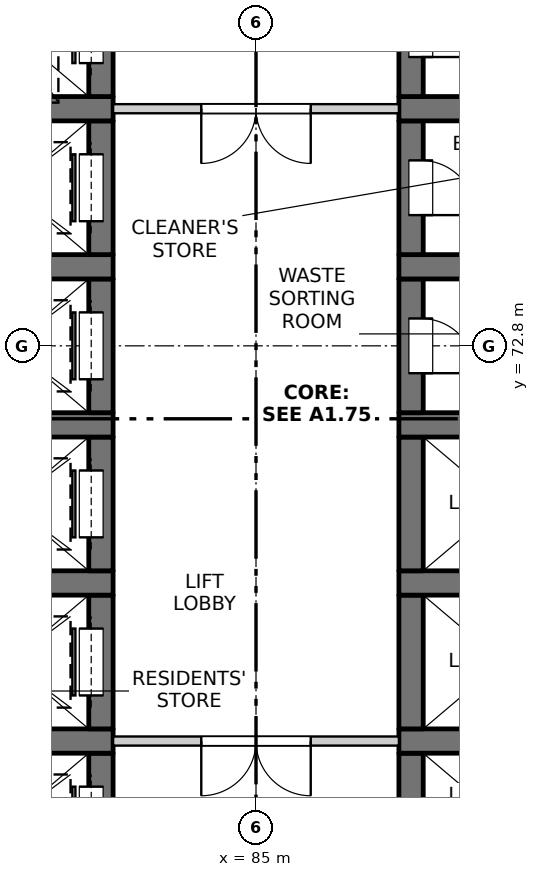
"""IFC4 building model, lengths in metres.
Left out: names, types, materials, properties, quantities, classifications, styles, units other than length and angle.
Written with IfcOpenShell. Run it as: python <this file> out.ifc"""

import sys

from ifc_helpers import new_model, si_unit, direction, frame, frame_2d, origin, place, context, subcontext, project, spatial, rectangle, extrude, element, fill, save


model = new_model("IFC4")
c1 = context("Model", 3, precision=1e-05, world=origin(), true_north=direction((0.0, 1.0)))
c2 = subcontext(c1, "Body", "Model", "MODEL_VIEW")
j1 = project(units=[si_unit("LENGTHUNIT", "METRE"), si_unit("PLANEANGLEUNIT", "RADIAN")], contexts=[c1])
p1 = place(None, origin())
s1 = spatial("IfcSite", under=j1, at=p1, CompositionType="ELEMENT")
p2 = place(p1, origin())
s2 = spatial("IfcBuilding", under=s1, at=p2, CompositionType="ELEMENT")
p3 = place(p2, frame((0.0, 0.0, 39.9)))
s3 = spatial("IfcBuildingStorey", under=s2, at=p3, CompositionType="ELEMENT", Elevation=39.9)
p4 = place(p3, frame((82.45, 63.9, -0.25), z_axis=(0.0, 0.0, 1.0), x_axis=(0.0, 1.0, 0.0)))
e1 = element("IfcWall", 1, at=p4, inside=s3, PredefinedType="SOLIDWALL", context=c2, shape_type="SweptSolid", body=[
    extrude(rectangle(XDim=2.2, YDim=0.4, at=frame_2d((1.1, 0.0))), origin(), (0.0, 0.0, 1.0), 3.4),
])
p5 = place(p4, frame((0.55, 0.0, 0.25)))
e2 = element("IfcOpeningElement", 2, at=p5, cuts=e1, PredefinedType="OPENING", context=c2, shape_type="SweptSolid", body=[
    extrude(rectangle(XDim=1.1, YDim=2.1, at=frame_2d((0.55, 1.05))), frame((0.0, 0.21, 0.0), z_axis=(0.0, -1.0, 0.0), x_axis=(1.0, 0.0, 0.0)), (0.0, 0.0, 1.0), 0.42),
])
p6 = place(p3, frame((79.65, 66.3, -0.25), z_axis=(0.0, 0.0, 1.0), x_axis=(1.0, 0.0, 0.0)))
e3 = element("IfcWall", 3, at=p6, inside=s3, PredefinedType="SOLIDWALL", context=c2, shape_type="SweptSolid", body=[
    extrude(rectangle(XDim=3.0, YDim=0.4, at=frame_2d((1.5, 0.0))), origin(), (0.0, 0.0, 1.0), 3.4),
])
p7 = place(p3, frame((82.45, 66.5, -0.25), z_axis=(0.0, 0.0, 1.0), x_axis=(0.0, 1.0, 0.0)))
e4 = element("IfcWall", 4, at=p7, inside=s3, PredefinedType="SOLIDWALL", context=c2, shape_type="SweptSolid", body=[
    extrude(rectangle(XDim=2.2, YDim=0.4, at=frame_2d((1.1, 0.0))), origin(), (0.0, 0.0, 1.0), 3.4),
])
p8 = place(p7, frame((0.55, 0.0, 0.25)))
e5 = element("IfcOpeningElement", 5, at=p8, cuts=e4, PredefinedType="OPENING", context=c2, shape_type="SweptSolid", body=[
    extrude(rectangle(XDim=1.1, YDim=2.1, at=frame_2d((0.55, 1.05))), frame((0.0, 0.21, 0.0), z_axis=(0.0, -1.0, 0.0), x_axis=(1.0, 0.0, 0.0)), (0.0, 0.0, 1.0), 0.42),
])
p9 = place(p3, frame((79.65, 68.9, -0.25), z_axis=(0.0, 0.0, 1.0), x_axis=(1.0, 0.0, 0.0)))
e6 = element("IfcWall", 6, at=p9, inside=s3, PredefinedType="SOLIDWALL", context=c2, shape_type="SweptSolid", body=[
    extrude(rectangle(XDim=3.0, YDim=0.4, at=frame_2d((1.5, 0.0))), origin(), (0.0, 0.0, 1.0), 3.4),
])
p10 = place(p3, frame((82.45, 69.1, -0.25), z_axis=(0.0, 0.0, 1.0), x_axis=(0.0, 1.0, 0.0)))
e7 = element("IfcWall", 7, at=p10, inside=s3, PredefinedType="SOLIDWALL", context=c2, shape_type="SweptSolid", body=[
    extrude(rectangle(XDim=2.2, YDim=0.4, at=frame_2d((1.1, 0.0))), origin(), (0.0, 0.0, 1.0), 3.4),
])
p11 = place(p10, frame((0.55, 0.0, 0.25)))
e8 = element("IfcOpeningElement", 8, at=p11, cuts=e7, PredefinedType="OPENING", context=c2, shape_type="SweptSolid", body=[
    extrude(rectangle(XDim=1.1, YDim=2.1, at=frame_2d((0.55, 1.05))), frame((0.0, 0.21, 0.0), z_axis=(0.0, -1.0, 0.0), x_axis=(1.0, 0.0, 0.0)), (0.0, 0.0, 1.0), 0.42),
])
p12 = place(p3, frame((79.65, 71.5, -0.25), z_axis=(0.0, 0.0, 1.0), x_axis=(1.0, 0.0, 0.0)))
e9 = element("IfcWall", 9, at=p12, inside=s3, PredefinedType="SOLIDWALL", context=c2, shape_type="SweptSolid", body=[
    extrude(rectangle(XDim=3.0, YDim=0.4, at=frame_2d((1.5, 0.0))), origin(), (0.0, 0.0, 1.0), 3.4),
])
p13 = place(p3, frame((82.45, 71.7, -0.25), z_axis=(0.0, 0.0, 1.0), x_axis=(0.0, 1.0, 0.0)))
e10 = element("IfcWall", 10, at=p13, inside=s3, PredefinedType="SOLIDWALL", context=c2, shape_type="SweptSolid", body=[
    extrude(rectangle(XDim=2.2, YDim=0.4, at=frame_2d((1.1, 0.0))), origin(), (0.0, 0.0, 1.0), 3.4),
])
p14 = place(p13, frame((0.55, 0.0, 0.25)))
e11 = element("IfcOpeningElement", 11, at=p14, cuts=e10, PredefinedType="OPENING", context=c2, shape_type="SweptSolid", body=[
    extrude(rectangle(XDim=1.1, YDim=2.1, at=frame_2d((0.55, 1.05))), frame((0.0, 0.21, 0.0), z_axis=(0.0, -1.0, 0.0), x_axis=(1.0, 0.0, 0.0)), (0.0, 0.0, 1.0), 0.42),
])
p15 = place(p3, frame((79.65, 74.1, -0.25), z_axis=(0.0, 0.0, 1.0), x_axis=(1.0, 0.0, 0.0)))
e12 = element("IfcWall", 12, at=p15, inside=s3, PredefinedType="SOLIDWALL", context=c2, shape_type="SweptSolid", body=[
    extrude(rectangle(XDim=3.0, YDim=0.4, at=frame_2d((1.5, 0.0))), origin(), (0.0, 0.0, 1.0), 3.4),
])
p16 = place(p3, frame((82.45, 74.3, -0.25), z_axis=(0.0, 0.0, 1.0), x_axis=(0.0, 1.0, 0.0)))
e13 = element("IfcWall", 13, at=p16, inside=s3, PredefinedType="SOLIDWALL", context=c2, shape_type="SweptSolid", body=[
    extrude(rectangle(XDim=2.2, YDim=0.4, at=frame_2d((1.1, 0.0))), origin(), (0.0, 0.0, 1.0), 3.4),
])
p17 = place(p16, frame((0.55, 0.0, 0.25)))
e14 = element("IfcOpeningElement", 14, at=p17, cuts=e13, PredefinedType="OPENING", context=c2, shape_type="SweptSolid", body=[
    extrude(rectangle(XDim=1.1, YDim=2.1, at=frame_2d((0.55, 1.05))), frame((0.0, 0.21, 0.0), z_axis=(0.0, -1.0, 0.0), x_axis=(1.0, 0.0, 0.0)), (0.0, 0.0, 1.0), 0.42),
])
p18 = place(p3, frame((79.65, 76.7, -0.25), z_axis=(0.0, 0.0, 1.0), x_axis=(1.0, 0.0, 0.0)))
e15 = element("IfcWall", 15, at=p18, inside=s3, PredefinedType="SOLIDWALL", context=c2, shape_type="SweptSolid", body=[
    extrude(rectangle(XDim=3.0, YDim=0.4, at=frame_2d((1.5, 0.0))), origin(), (0.0, 0.0, 1.0), 3.4),
])
p19 = place(p3, frame((82.45, 76.9, -0.25), z_axis=(0.0, 0.0, 1.0), x_axis=(0.0, 1.0, 0.0)))
e16 = element("IfcWall", 16, at=p19, inside=s3, PredefinedType="SOLIDWALL", context=c2, shape_type="SweptSolid", body=[
    extrude(rectangle(XDim=2.2, YDim=0.4, at=frame_2d((1.1, 0.0))), origin(), (0.0, 0.0, 1.0), 3.4),
])
p20 = place(p19, frame((0.55, 0.0, 0.25)))
e17 = element("IfcOpeningElement", 17, at=p20, cuts=e16, PredefinedType="OPENING", context=c2, shape_type="SweptSolid", body=[
    extrude(rectangle(XDim=1.1, YDim=2.1, at=frame_2d((0.55, 1.05))), frame((0.0, 0.21, 0.0), z_axis=(0.0, -1.0, 0.0), x_axis=(1.0, 0.0, 0.0)), (0.0, 0.0, 1.0), 0.42),
])
p21 = place(p3, frame((87.55, 63.9, -0.25), z_axis=(0.0, 0.0, 1.0), x_axis=(0.0, 1.0, 0.0)))
e18 = element("IfcWall", 18, at=p21, inside=s3, PredefinedType="SOLIDWALL", context=c2, shape_type="SweptSolid", body=[
    extrude(rectangle(XDim=2.2, YDim=0.4, at=frame_2d((1.1, 0.0))), origin(), (0.0, 0.0, 1.0), 3.4),
])
p22 = place(p3, frame((87.35, 66.3, -0.25), z_axis=(0.0, 0.0, 1.0), x_axis=(1.0, 0.0, 0.0)))
e19 = element("IfcWall", 19, at=p22, inside=s3, PredefinedType="SOLIDWALL", context=c2, shape_type="SweptSolid", body=[
    extrude(rectangle(XDim=3.0, YDim=0.4, at=frame_2d((1.5, 0.0))), origin(), (0.0, 0.0, 1.0), 3.4),
])
p23 = place(p3, frame((87.55, 66.5, -0.25), z_axis=(0.0, 0.0, 1.0), x_axis=(0.0, 1.0, 0.0)))
e20 = element("IfcWall", 20, at=p23, inside=s3, PredefinedType="SOLIDWALL", context=c2, shape_type="SweptSolid", body=[
    extrude(rectangle(XDim=2.2, YDim=0.4, at=frame_2d((1.1, 0.0))), origin(), (0.0, 0.0, 1.0), 3.4),
])
p24 = place(p3, frame((87.35, 68.9, -0.25), z_axis=(0.0, 0.0, 1.0), x_axis=(1.0, 0.0, 0.0)))
e21 = element("IfcWall", 21, at=p24, inside=s3, PredefinedType="SOLIDWALL", context=c2, shape_type="SweptSolid", body=[
    extrude(rectangle(XDim=3.0, YDim=0.4, at=frame_2d((1.5, 0.0))), origin(), (0.0, 0.0, 1.0), 3.4),
])
p25 = place(p3, frame((87.55, 69.1, -0.25), z_axis=(0.0, 0.0, 1.0), x_axis=(0.0, 1.0, 0.0)))
e22 = element("IfcWall", 22, at=p25, inside=s3, PredefinedType="SOLIDWALL", context=c2, shape_type="SweptSolid", body=[
    extrude(rectangle(XDim=2.2, YDim=0.4, at=frame_2d((1.1, 0.0))), origin(), (0.0, 0.0, 1.0), 3.4),
])
p26 = place(p3, frame((87.35, 71.5, -0.25), z_axis=(0.0, 0.0, 1.0), x_axis=(1.0, 0.0, 0.0)))
e23 = element("IfcWall", 23, at=p26, inside=s3, PredefinedType="SOLIDWALL", context=c2, shape_type="SweptSolid", body=[
    extrude(rectangle(XDim=3.0, YDim=0.4, at=frame_2d((1.5, 0.0))), origin(), (0.0, 0.0, 1.0), 3.4),
])
p27 = place(p3, frame((87.55, 71.7, -0.25), z_axis=(0.0, 0.0, 1.0), x_axis=(0.0, 1.0, 0.0)))
e24 = element("IfcWall", 24, at=p27, inside=s3, PredefinedType="SOLIDWALL", context=c2, shape_type="SweptSolid", body=[
    extrude(rectangle(XDim=2.2, YDim=0.4, at=frame_2d((1.1, 0.0))), origin(), (0.0, 0.0, 1.0), 3.4),
])
p28 = place(p27, frame((0.65, 0.0, 0.25)))
e25 = element("IfcOpeningElement", 25, at=p28, cuts=e24, PredefinedType="OPENING", context=c2, shape_type="SweptSolid", body=[
    extrude(rectangle(XDim=0.9, YDim=2.1, at=frame_2d((0.45, 1.05))), frame((0.0, 0.21, 0.0), z_axis=(0.0, -1.0, 0.0), x_axis=(1.0, 0.0, 0.0)), (0.0, 0.0, 1.0), 0.42),
])
p29 = place(p3, frame((87.35, 74.1, -0.25), z_axis=(0.0, 0.0, 1.0), x_axis=(1.0, 0.0, 0.0)))
e26 = element("IfcWall", 26, at=p29, inside=s3, PredefinedType="SOLIDWALL", context=c2, shape_type="SweptSolid", body=[
    extrude(rectangle(XDim=3.0, YDim=0.4, at=frame_2d((1.5, 0.0))), origin(), (0.0, 0.0, 1.0), 3.4),
])
p30 = place(p3, frame((87.55, 74.3, -0.25), z_axis=(0.0, 0.0, 1.0), x_axis=(0.0, 1.0, 0.0)))
e27 = element("IfcWall", 27, at=p30, inside=s3, PredefinedType="SOLIDWALL", context=c2, shape_type="SweptSolid", body=[
    extrude(rectangle(XDim=2.2, YDim=0.4, at=frame_2d((1.1, 0.0))), origin(), (0.0, 0.0, 1.0), 3.4),
])
p31 = place(p30, frame((0.65, 0.0, 0.25)))
e28 = element("IfcOpeningElement", 28, at=p31, cuts=e27, PredefinedType="OPENING", context=c2, shape_type="SweptSolid", body=[
    extrude(rectangle(XDim=0.9, YDim=2.1, at=frame_2d((0.45, 1.05))), frame((0.0, 0.21, 0.0), z_axis=(0.0, -1.0, 0.0), x_axis=(1.0, 0.0, 0.0)), (0.0, 0.0, 1.0), 0.42),
])
p32 = place(p3, frame((87.35, 76.7, -0.25), z_axis=(0.0, 0.0, 1.0), x_axis=(1.0, 0.0, 0.0)))
e29 = element("IfcWall", 29, at=p32, inside=s3, PredefinedType="SOLIDWALL", context=c2, shape_type="SweptSolid", body=[
    extrude(rectangle(XDim=3.0, YDim=0.4, at=frame_2d((1.5, 0.0))), origin(), (0.0, 0.0, 1.0), 3.4),
])
p33 = place(p3, frame((87.55, 76.9, -0.25), z_axis=(0.0, 0.0, 1.0), x_axis=(0.0, 1.0, 0.0)))
e30 = element("IfcWall", 30, at=p33, inside=s3, PredefinedType="SOLIDWALL", context=c2, shape_type="SweptSolid", body=[
    extrude(rectangle(XDim=2.2, YDim=0.4, at=frame_2d((1.1, 0.0))), origin(), (0.0, 0.0, 1.0), 3.4),
])
p34 = place(p33, frame((0.65, 0.0, 0.25)))
e31 = element("IfcOpeningElement", 31, at=p34, cuts=e30, PredefinedType="OPENING", context=c2, shape_type="SweptSolid", body=[
    extrude(rectangle(XDim=0.9, YDim=2.1, at=frame_2d((0.45, 1.05))), frame((0.0, 0.21, 0.0), z_axis=(0.0, -1.0, 0.0), x_axis=(1.0, 0.0, 0.0)), (0.0, 0.0, 1.0), 0.42),
])
p35 = place(p3, frame((82.65, 66.3, 0.0), z_axis=(0.0, 0.0, 1.0), x_axis=(1.0, 0.0, 0.0)))
e32 = element("IfcWall", 32, at=p35, inside=s3, PredefinedType="PARTITIONING", context=c2, shape_type="SweptSolid", body=[
    extrude(rectangle(XDim=4.7, YDim=0.15, at=frame_2d((2.35, 0.0))), origin(), (0.0, 0.0, 1.0), 3.15),
])
p36 = place(p35, frame((1.45, 0.0, 0.0)))
e33 = element("IfcOpeningElement", 33, at=p36, cuts=e32, PredefinedType="OPENING", context=c2, shape_type="SweptSolid", body=[
    extrude(rectangle(XDim=1.8, YDim=2.1, at=frame_2d((0.9, 1.05))), frame((0.0, 0.085, 0.0), z_axis=(0.0, -1.0, 0.0), x_axis=(1.0, 0.0, 0.0)), (0.0, 0.0, 1.0), 0.17),
])
p37 = place(p3, frame((82.65, 76.7, 0.0), z_axis=(0.0, 0.0, 1.0), x_axis=(1.0, 0.0, 0.0)))
e34 = element("IfcWall", 34, at=p37, inside=s3, PredefinedType="PARTITIONING", context=c2, shape_type="SweptSolid", body=[
    extrude(rectangle(XDim=4.7, YDim=0.15, at=frame_2d((2.35, 0.0))), origin(), (0.0, 0.0, 1.0), 3.15),
])
p38 = place(p37, frame((1.45, 0.0, 0.0)))
e35 = element("IfcOpeningElement", 35, at=p38, cuts=e34, PredefinedType="OPENING", context=c2, shape_type="SweptSolid", body=[
    extrude(rectangle(XDim=1.8, YDim=2.1, at=frame_2d((0.9, 1.05))), frame((0.0, 0.085, 0.0), z_axis=(0.0, -1.0, 0.0), x_axis=(1.0, 0.0, 0.0)), (0.0, 0.0, 1.0), 0.17),
])
p39 = place(p5, origin())
e36 = element("IfcDoor", 36, at=p39, inside=s3, OperationType="SLIDING_TO_RIGHT", PredefinedType="DOOR", context=c2, shape_type="SweptSolid", body=[
    extrude(rectangle(XDim=1.1, YDim=2.1, at=frame_2d((0.55, 1.05))), frame((0.0, 0.185, 0.0), z_axis=(0.0, -1.0, 0.0), x_axis=(1.0, 0.0, 0.0)), (0.0, 0.0, 1.0), 0.05),
])
fill(e2, e36)
p40 = place(p36, origin())
e37 = element("IfcDoor", 37, at=p40, inside=s3, OperationType="DOUBLE_DOOR_SINGLE_SWING", PredefinedType="DOOR", context=c2, shape_type="SweptSolid", body=[
    extrude(rectangle(XDim=1.8, YDim=2.1, at=frame_2d((0.9, 1.05))), frame((0.0, 0.025, 0.0), z_axis=(0.0, -1.0, 0.0), x_axis=(1.0, 0.0, 0.0)), (0.0, 0.0, 1.0), 0.05),
])
fill(e33, e37)
p41 = place(p8, origin())
e38 = element("IfcDoor", 38, at=p41, inside=s3, OperationType="SLIDING_TO_RIGHT", PredefinedType="DOOR", context=c2, shape_type="SweptSolid", body=[
    extrude(rectangle(XDim=1.1, YDim=2.1, at=frame_2d((0.55, 1.05))), frame((0.0, 0.185, 0.0), z_axis=(0.0, -1.0, 0.0), x_axis=(1.0, 0.0, 0.0)), (0.0, 0.0, 1.0), 0.05),
])
fill(e5, e38)
p42 = place(p11, origin())
e39 = element("IfcDoor", 39, at=p42, inside=s3, OperationType="SLIDING_TO_LEFT", PredefinedType="DOOR", context=c2, shape_type="SweptSolid", body=[
    extrude(rectangle(XDim=1.1, YDim=2.1, at=frame_2d((0.55, 1.05))), frame((0.0, 0.185, 0.0), z_axis=(0.0, -1.0, 0.0), x_axis=(1.0, 0.0, 0.0)), (0.0, 0.0, 1.0), 0.05),
])
fill(e8, e39)
p43 = place(p14, origin())
e40 = element("IfcDoor", 40, at=p43, inside=s3, OperationType="SLIDING_TO_LEFT", PredefinedType="DOOR", context=c2, shape_type="SweptSolid", body=[
    extrude(rectangle(XDim=1.1, YDim=2.1, at=frame_2d((0.55, 1.05))), frame((0.0, 0.185, 0.0), z_axis=(0.0, -1.0, 0.0), x_axis=(1.0, 0.0, 0.0)), (0.0, 0.0, 1.0), 0.05),
])
fill(e11, e40)
p44 = place(p28, origin())
e41 = element("IfcDoor", 41, at=p44, inside=s3, OperationType="SINGLE_SWING_RIGHT", PredefinedType="DOOR", context=c2, shape_type="SweptSolid", body=[
    extrude(rectangle(XDim=0.9, YDim=2.1, at=frame_2d((0.45, 1.05))), frame((0.0, -0.135, 0.0), z_axis=(0.0, -1.0, 0.0), x_axis=(1.0, 0.0, 0.0)), (0.0, 0.0, 1.0), 0.05),
])
fill(e25, e41)
p45 = place(p17, origin())
e42 = element("IfcDoor", 42, at=p45, inside=s3, OperationType="SLIDING_TO_LEFT", PredefinedType="DOOR", context=c2, shape_type="SweptSolid", body=[
    extrude(rectangle(XDim=1.1, YDim=2.1, at=frame_2d((0.55, 1.05))), frame((0.0, 0.185, 0.0), z_axis=(0.0, -1.0, 0.0), x_axis=(1.0, 0.0, 0.0)), (0.0, 0.0, 1.0), 0.05),
])
fill(e14, e42)
p46 = place(p31, origin())
e43 = element("IfcDoor", 43, at=p46, inside=s3, OperationType="SINGLE_SWING_RIGHT", PredefinedType="DOOR", context=c2, shape_type="SweptSolid", body=[
    extrude(rectangle(XDim=0.9, YDim=2.1, at=frame_2d((0.45, 1.05))), frame((0.0, -0.135, 0.0), z_axis=(0.0, -1.0, 0.0), x_axis=(1.0, 0.0, 0.0)), (0.0, 0.0, 1.0), 0.05),
])
fill(e28, e43)
p47 = place(p38, origin())
e44 = element("IfcDoor", 44, at=p47, inside=s3, OperationType="DOUBLE_DOOR_SINGLE_SWING", PredefinedType="DOOR", context=c2, shape_type="SweptSolid", body=[
    extrude(rectangle(XDim=1.8, YDim=2.1, at=frame_2d((0.9, 1.05))), frame((0.0, 0.025, 0.0), z_axis=(0.0, -1.0, 0.0), x_axis=(1.0, 0.0, 0.0)), (0.0, 0.0, 1.0), 0.05),
])
fill(e35, e44)
p48 = place(p20, origin())
e45 = element("IfcDoor", 45, at=p48, inside=s3, OperationType="SLIDING_TO_LEFT", PredefinedType="DOOR", context=c2, shape_type="SweptSolid", body=[
    extrude(rectangle(XDim=1.1, YDim=2.1, at=frame_2d((0.55, 1.05))), frame((0.0, 0.185, 0.0), z_axis=(0.0, -1.0, 0.0), x_axis=(1.0, 0.0, 0.0)), (0.0, 0.0, 1.0), 0.05),
])
fill(e17, e45)
p49 = place(p34, origin())
e46 = element("IfcDoor", 46, at=p49, inside=s3, OperationType="SINGLE_SWING_RIGHT", PredefinedType="DOOR", context=c2, shape_type="SweptSolid", body=[
    extrude(rectangle(XDim=0.9, YDim=2.1, at=frame_2d((0.45, 1.05))), frame((0.0, -0.135, 0.0), z_axis=(0.0, -1.0, 0.0), x_axis=(1.0, 0.0, 0.0)), (0.0, 0.0, 1.0), 0.05),
])
fill(e31, e46)
save(model, sys.argv[1])
